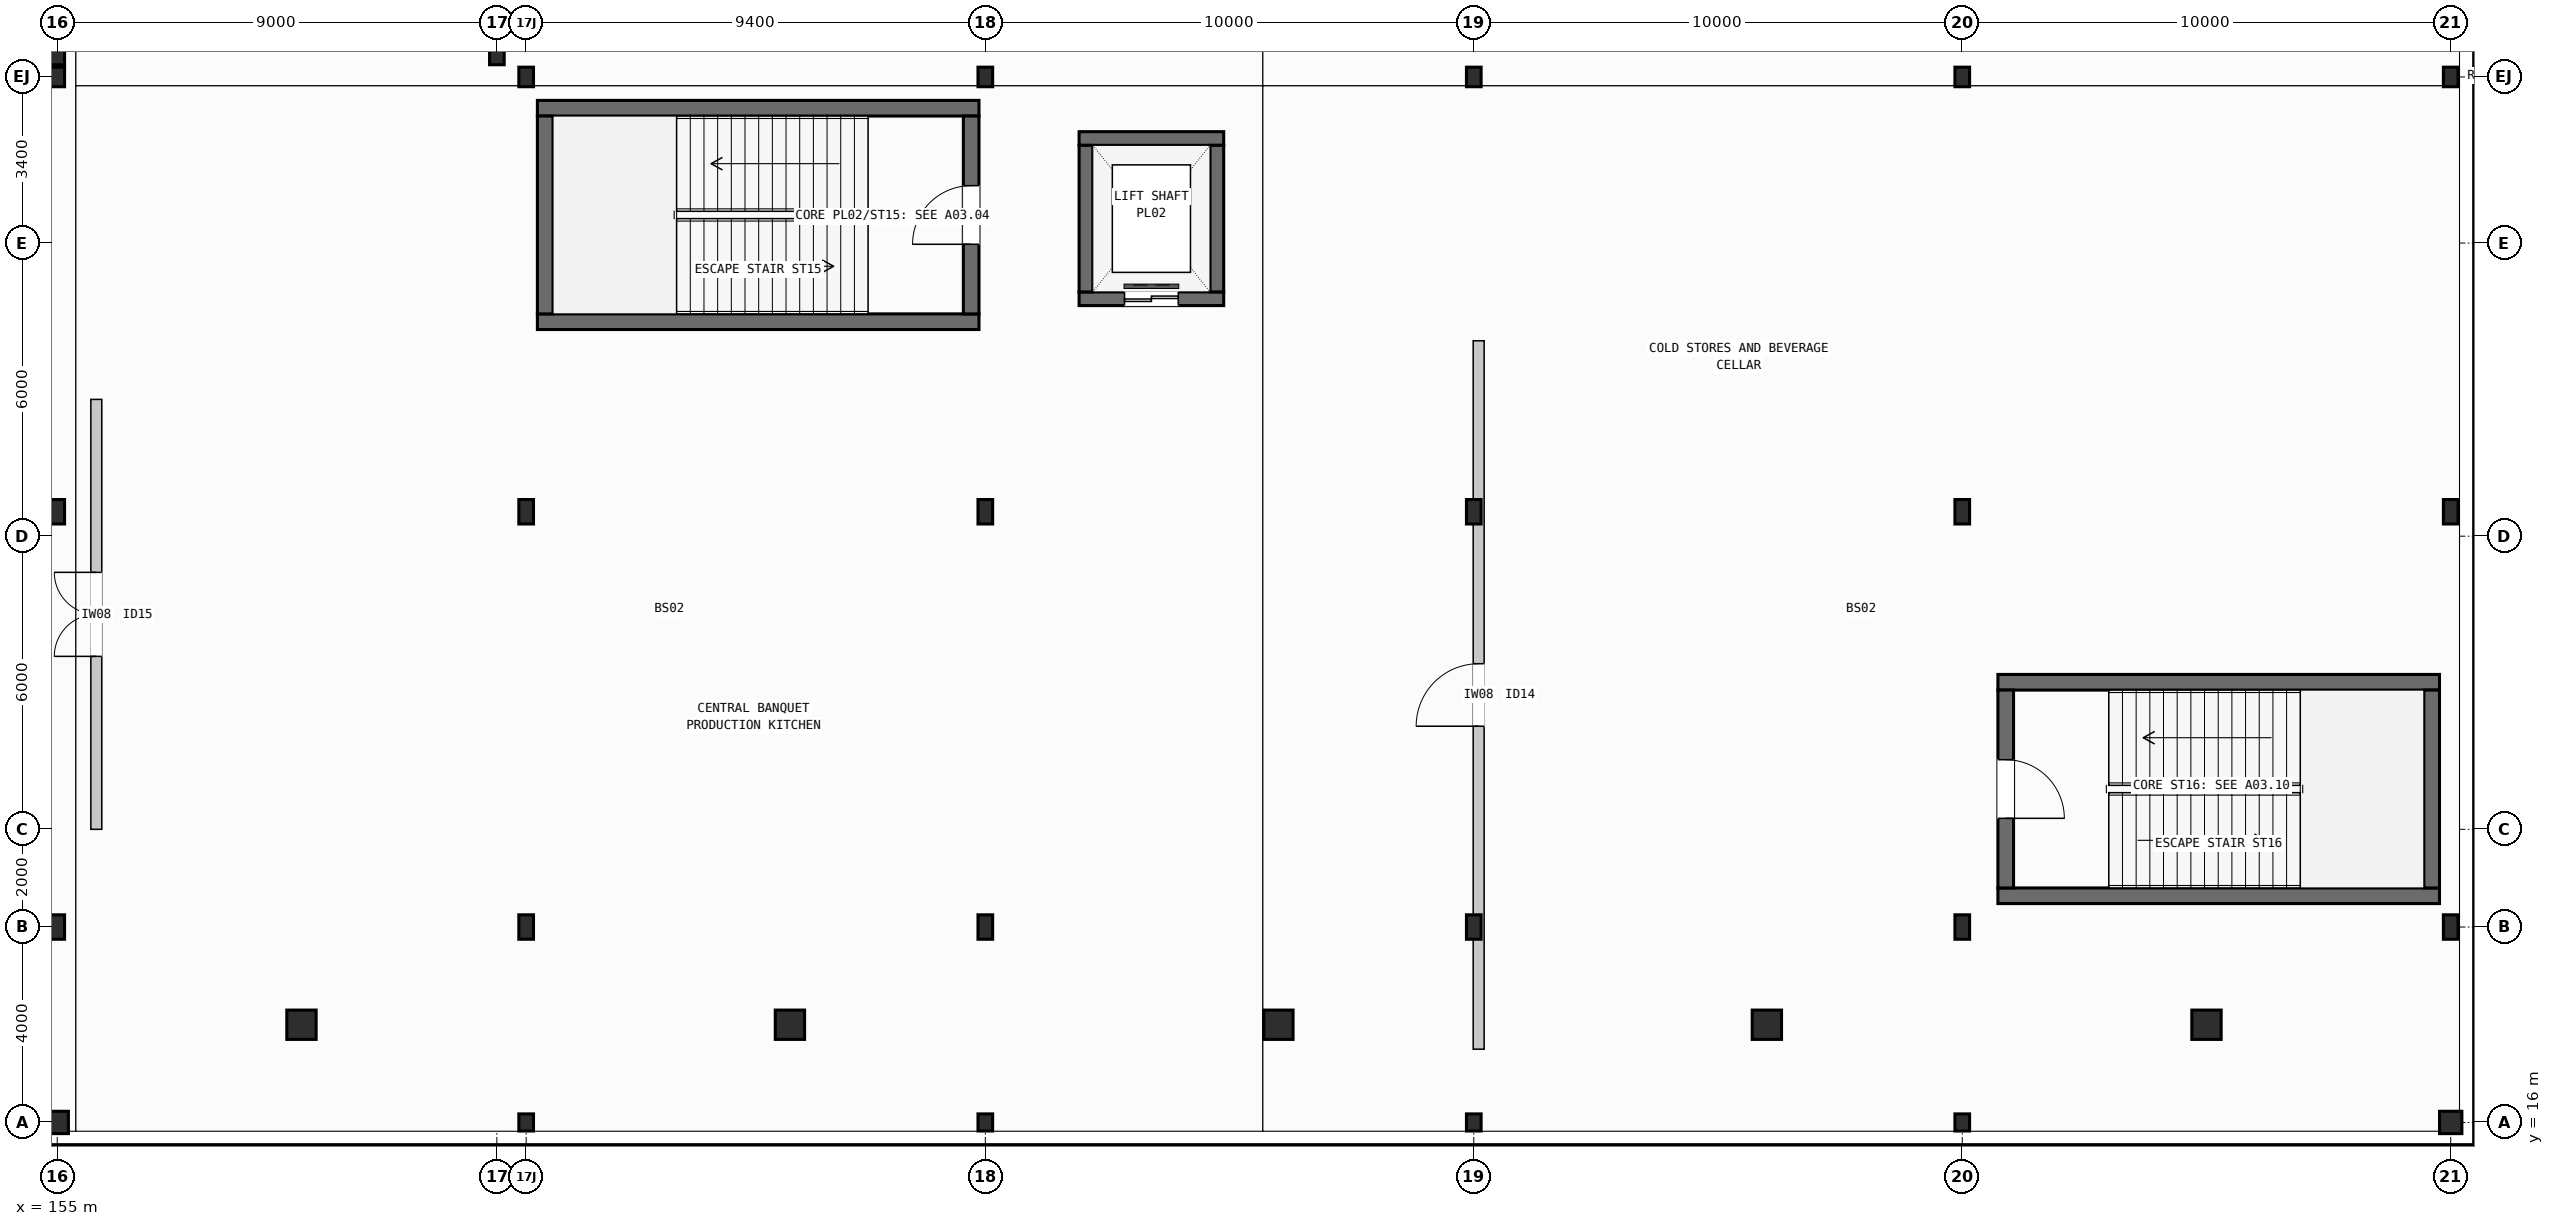
"""IFC4 building model, lengths in metres.
Left out: names, types, materials, properties, quantities, classifications, styles, units other than length and angle.
Written with IfcOpenShell. Run it as: python <this file> out.ifc"""

import sys

from ifc_helpers import new_model, si_unit, direction, frame, frame_2d, origin, origin_2d, place, context, subcontext, project, spatial, rectangle, hollow_circle, i_section, extrude, element, fill, save


model = new_model("IFC4")
c1 = context("Model", 3, precision=1e-05, world=origin(), true_north=direction((0.0, 1.0)))
c2 = subcontext(c1, "Body", "Model", "MODEL_VIEW")
j1 = project(units=[si_unit("LENGTHUNIT", "METRE"), si_unit("PLANEANGLEUNIT", "RADIAN")], contexts=[c1])
p1 = place(None, origin())
s1 = spatial("IfcSite", under=j1, at=p1, CompositionType="ELEMENT")
p2 = place(p1, origin())
s2 = spatial("IfcBuilding", under=s1, at=p2, CompositionType="ELEMENT")
p3 = place(p2, frame((0.0, 0.0, -5.4)))
s3 = spatial("IfcBuildingStorey", under=s2, at=p3, CompositionType="ELEMENT", Elevation=-5.4)
p4 = place(p3, frame((155.0, 16.0, 0.0), z_axis=(0.0, 0.0, 1.0), x_axis=(1.0, 0.0, 0.0)))
e1 = element("IfcColumn", 1, at=p4, inside=s3, PredefinedType="COLUMN", context=c2, shape_type="SweptSolid", body=[
    extrude(hollow_circle(Radius=0.229, WallThickness=0.016, at=origin_2d()), origin(), (0.0, 0.0, 1.0), 5.4),
])
for number, where, z_axis, x_axis in (
    (2, (155.0, 20.0, 0.0), (0.0, 0.0, 1.0), (1.0, 0.0, 0.0)),
    (3, (155.0, 28.5, 0.0), (0.0, 0.0, 1.0), (1.0, 0.0, 0.0)),
):
    element("IfcColumn", number, at=place(p3, frame(where, z_axis=z_axis, x_axis=x_axis)), inside=s3, PredefinedType="COLUMN", context=c2, shape_type="SweptSolid", body=[
        extrude(i_section(OverallWidth=0.3, OverallDepth=0.5, WebThickness=0.014, FlangeThickness=0.028, FilletRadius=0.027, at=origin_2d()), origin(), (0.0, 0.0, 1.0), 5.4),
    ])
p5 = place(p3, frame((155.0, 37.4, 0.0), z_axis=(0.0, 0.0, 1.0), x_axis=(1.0, 0.0, 0.0)))
e4 = element("IfcColumn", 4, at=p5, inside=s3, PredefinedType="COLUMN", context=c2, shape_type="SweptSolid", body=[
    extrude(i_section(OverallWidth=0.3, OverallDepth=0.4, WebThickness=0.013, FlangeThickness=0.024, FilletRadius=0.027, at=origin_2d()), origin(), (0.0, 0.0, 1.0), 5.4),
])
for number, where, z_axis, x_axis in (
    (5, (155.0, 38.0, 0.0), (0.0, 0.0, 1.0), (1.0, 0.0, 0.0)),
    (6, (164.0, 38.0, 0.0), (0.0, 0.0, 1.0), (1.0, 0.0, 0.0)),
):
    element("IfcColumn", number, at=place(p3, frame(where, z_axis=z_axis, x_axis=x_axis)), inside=s3, PredefinedType="COLUMN", context=c2, shape_type="SweptSolid", body=[
        extrude(i_section(OverallWidth=0.3, OverallDepth=0.7, WebThickness=0.017, FlangeThickness=0.032, FilletRadius=0.027, at=origin_2d()), origin(), (0.0, 0.0, 1.0), 5.4),
    ])
p6 = place(p3, frame((164.6, 16.0, 0.0), z_axis=(0.0, 0.0, 1.0), x_axis=(1.0, 0.0, 0.0)))
e7 = element("IfcColumn", 7, at=p6, inside=s3, PredefinedType="PILASTER", context=c2, shape_type="SweptSolid", body=[
    extrude(i_section(OverallWidth=0.3, OverallDepth=0.35, WebThickness=0.01, FlangeThickness=0.018, FilletRadius=0.027, at=origin_2d()), origin(), (0.0, 0.0, 1.0), 5.4),
])
for number, where, z_axis, x_axis in (
    (8, (164.6, 20.0, 0.0), (0.0, 0.0, 1.0), (1.0, 0.0, 0.0)),
    (9, (164.6, 28.5, 0.0), (0.0, 0.0, 1.0), (1.0, 0.0, 0.0)),
):
    element("IfcColumn", number, at=place(p3, frame(where, z_axis=z_axis, x_axis=x_axis)), inside=s3, PredefinedType="COLUMN", context=c2, shape_type="SweptSolid", body=[
        extrude(i_section(OverallWidth=0.3, OverallDepth=0.5, WebThickness=0.014, FlangeThickness=0.028, FilletRadius=0.027, at=origin_2d()), origin(), (0.0, 0.0, 1.0), 5.4),
    ])
p7 = place(p3, frame((164.6, 37.4, 0.0), z_axis=(0.0, 0.0, 1.0), x_axis=(1.0, 0.0, 0.0)))
e10 = element("IfcColumn", 10, at=p7, inside=s3, PredefinedType="COLUMN", context=c2, shape_type="SweptSolid", body=[
    extrude(i_section(OverallWidth=0.3, OverallDepth=0.4, WebThickness=0.013, FlangeThickness=0.024, FilletRadius=0.027, at=origin_2d()), origin(), (0.0, 0.0, 1.0), 5.4),
])
p8 = place(p3, frame((174.0, 16.0, 0.0), z_axis=(0.0, 0.0, 1.0), x_axis=(1.0, 0.0, 0.0)))
e11 = element("IfcColumn", 11, at=p8, inside=s3, PredefinedType="PILASTER", context=c2, shape_type="SweptSolid", body=[
    extrude(i_section(OverallWidth=0.3, OverallDepth=0.35, WebThickness=0.01, FlangeThickness=0.018, FilletRadius=0.027, at=origin_2d()), origin(), (0.0, 0.0, 1.0), 5.4),
])
for number, where, z_axis, x_axis in (
    (12, (174.0, 20.0, 0.0), (0.0, 0.0, 1.0), (1.0, 0.0, 0.0)),
    (13, (174.0, 28.5, 0.0), (0.0, 0.0, 1.0), (1.0, 0.0, 0.0)),
):
    element("IfcColumn", number, at=place(p3, frame(where, z_axis=z_axis, x_axis=x_axis)), inside=s3, PredefinedType="COLUMN", context=c2, shape_type="SweptSolid", body=[
        extrude(i_section(OverallWidth=0.3, OverallDepth=0.5, WebThickness=0.014, FlangeThickness=0.028, FilletRadius=0.027, at=origin_2d()), origin(), (0.0, 0.0, 1.0), 5.4),
    ])
p9 = place(p3, frame((174.0, 37.4, 0.0), z_axis=(0.0, 0.0, 1.0), x_axis=(1.0, 0.0, 0.0)))
e14 = element("IfcColumn", 14, at=p9, inside=s3, PredefinedType="COLUMN", context=c2, shape_type="SweptSolid", body=[
    extrude(i_section(OverallWidth=0.3, OverallDepth=0.4, WebThickness=0.013, FlangeThickness=0.024, FilletRadius=0.027, at=origin_2d()), origin(), (0.0, 0.0, 1.0), 5.4),
])
p10 = place(p3, frame((184.0, 16.0, 0.0), z_axis=(0.0, 0.0, 1.0), x_axis=(1.0, 0.0, 0.0)))
e15 = element("IfcColumn", 15, at=p10, inside=s3, PredefinedType="PILASTER", context=c2, shape_type="SweptSolid", body=[
    extrude(i_section(OverallWidth=0.3, OverallDepth=0.35, WebThickness=0.01, FlangeThickness=0.018, FilletRadius=0.027, at=origin_2d()), origin(), (0.0, 0.0, 1.0), 5.4),
])
for number, where, z_axis, x_axis in (
    (16, (184.0, 20.0, 0.0), (0.0, 0.0, 1.0), (1.0, 0.0, 0.0)),
    (17, (184.0, 28.5, 0.0), (0.0, 0.0, 1.0), (1.0, 0.0, 0.0)),
):
    element("IfcColumn", number, at=place(p3, frame(where, z_axis=z_axis, x_axis=x_axis)), inside=s3, PredefinedType="COLUMN", context=c2, shape_type="SweptSolid", body=[
        extrude(i_section(OverallWidth=0.3, OverallDepth=0.5, WebThickness=0.014, FlangeThickness=0.028, FilletRadius=0.027, at=origin_2d()), origin(), (0.0, 0.0, 1.0), 5.4),
    ])
p11 = place(p3, frame((184.0, 37.4, 0.0), z_axis=(0.0, 0.0, 1.0), x_axis=(1.0, 0.0, 0.0)))
e18 = element("IfcColumn", 18, at=p11, inside=s3, PredefinedType="COLUMN", context=c2, shape_type="SweptSolid", body=[
    extrude(i_section(OverallWidth=0.3, OverallDepth=0.4, WebThickness=0.013, FlangeThickness=0.024, FilletRadius=0.027, at=origin_2d()), origin(), (0.0, 0.0, 1.0), 5.4),
])
p12 = place(p3, frame((194.0, 16.0, 0.0), z_axis=(0.0, 0.0, 1.0), x_axis=(1.0, 0.0, 0.0)))
e19 = element("IfcColumn", 19, at=p12, inside=s3, PredefinedType="PILASTER", context=c2, shape_type="SweptSolid", body=[
    extrude(i_section(OverallWidth=0.3, OverallDepth=0.35, WebThickness=0.01, FlangeThickness=0.018, FilletRadius=0.027, at=origin_2d()), origin(), (0.0, 0.0, 1.0), 5.4),
])
for number, where, z_axis, x_axis in (
    (20, (194.0, 20.0, 0.0), (0.0, 0.0, 1.0), (1.0, 0.0, 0.0)),
    (21, (194.0, 28.5, 0.0), (0.0, 0.0, 1.0), (1.0, 0.0, 0.0)),
):
    element("IfcColumn", number, at=place(p3, frame(where, z_axis=z_axis, x_axis=x_axis)), inside=s3, PredefinedType="COLUMN", context=c2, shape_type="SweptSolid", body=[
        extrude(i_section(OverallWidth=0.3, OverallDepth=0.5, WebThickness=0.014, FlangeThickness=0.028, FilletRadius=0.027, at=origin_2d()), origin(), (0.0, 0.0, 1.0), 5.4),
    ])
p13 = place(p3, frame((194.0, 37.4, 0.0), z_axis=(0.0, 0.0, 1.0), x_axis=(1.0, 0.0, 0.0)))
e22 = element("IfcColumn", 22, at=p13, inside=s3, PredefinedType="COLUMN", context=c2, shape_type="SweptSolid", body=[
    extrude(i_section(OverallWidth=0.3, OverallDepth=0.4, WebThickness=0.013, FlangeThickness=0.024, FilletRadius=0.027, at=origin_2d()), origin(), (0.0, 0.0, 1.0), 5.4),
])
p14 = place(p3, frame((204.0, 16.0, 0.0), z_axis=(0.0, 0.0, 1.0), x_axis=(1.0, 0.0, 0.0)))
e23 = element("IfcColumn", 23, at=p14, inside=s3, PredefinedType="COLUMN", context=c2, shape_type="SweptSolid", body=[
    extrude(hollow_circle(Radius=0.229, WallThickness=0.016, at=origin_2d()), origin(), (0.0, 0.0, 1.0), 5.4),
])
for number, where, z_axis, x_axis in (
    (24, (204.0, 20.0, 0.0), (0.0, 0.0, 1.0), (1.0, 0.0, 0.0)),
    (25, (204.0, 28.5, 0.0), (0.0, 0.0, 1.0), (1.0, 0.0, 0.0)),
):
    element("IfcColumn", number, at=place(p3, frame(where, z_axis=z_axis, x_axis=x_axis)), inside=s3, PredefinedType="COLUMN", context=c2, shape_type="SweptSolid", body=[
        extrude(i_section(OverallWidth=0.3, OverallDepth=0.5, WebThickness=0.014, FlangeThickness=0.028, FilletRadius=0.027, at=origin_2d()), origin(), (0.0, 0.0, 1.0), 5.4),
    ])
p15 = place(p3, frame((204.0, 37.4, 0.0), z_axis=(0.0, 0.0, 1.0), x_axis=(1.0, 0.0, 0.0)))
e26 = element("IfcColumn", 26, at=p15, inside=s3, PredefinedType="COLUMN", context=c2, shape_type="SweptSolid", body=[
    extrude(i_section(OverallWidth=0.3, OverallDepth=0.4, WebThickness=0.013, FlangeThickness=0.024, FilletRadius=0.027, at=origin_2d()), origin(), (0.0, 0.0, 1.0), 5.4),
])
for number, where, z_axis, x_axis in (
    (27, (164.83, 32.39, 0.0), (0.0, 0.0, 1.0), (1.0, 0.0, 0.0)),
    (28, (164.83, 36.76, 0.0), (0.0, 0.0, 1.0), (1.0, 0.0, 0.0)),
):
    element("IfcWall", number, at=place(p3, frame(where, z_axis=z_axis, x_axis=x_axis)), inside=s3, PredefinedType="SHEAR", context=c2, shape_type="SweptSolid", body=[
        extrude(rectangle(XDim=9.04, YDim=0.32, at=frame_2d((4.52, 0.0))), origin(), (0.0, 0.0, 1.0), 5.4),
    ])
p16 = place(p3, frame((164.99, 32.55, 0.0), z_axis=(0.0, 0.0, 1.0), x_axis=(0.0, 1.0, 0.0)))
e29 = element("IfcWall", 29, at=p16, inside=s3, PredefinedType="SHEAR", context=c2, shape_type="SweptSolid", body=[
    extrude(rectangle(XDim=4.05, YDim=0.32, at=frame_2d((2.025, 0.0))), origin(), (0.0, 0.0, 1.0), 5.4),
])
p17 = place(p3, frame((173.71, 32.55, 0.0), z_axis=(0.0, 0.0, 1.0), x_axis=(0.0, 1.0, 0.0)))
e30 = element("IfcWall", 30, at=p17, inside=s3, PredefinedType="SHEAR", context=c2, shape_type="SweptSolid", body=[
    extrude(rectangle(XDim=4.05, YDim=0.32, at=frame_2d((2.025, 0.0))), origin(), (0.0, 0.0, 1.0), 5.4),
])
p18 = place(p17, frame((1.425, 0.0, 0.0)))
e31 = element("IfcOpeningElement", 31, at=p18, cuts=e30, PredefinedType="OPENING", context=c2, shape_type="SweptSolid", body=[
    extrude(rectangle(XDim=1.2, YDim=2.2, at=frame_2d((0.6, 1.1))), frame((0.0, 0.17, 0.0), z_axis=(0.0, -1.0, 0.0), x_axis=(1.0, 0.0, 0.0)), (0.0, 0.0, 1.0), 0.34),
])
for number, where, z_axis, x_axis in (
    (32, (194.73, 20.64, 0.0), (0.0, 0.0, 1.0), (1.0, 0.0, 0.0)),
    (33, (194.73, 25.01, 0.0), (0.0, 0.0, 1.0), (1.0, 0.0, 0.0)),
):
    element("IfcWall", number, at=place(p3, frame(where, z_axis=z_axis, x_axis=x_axis)), inside=s3, PredefinedType="SHEAR", context=c2, shape_type="SweptSolid", body=[
        extrude(rectangle(XDim=9.04, YDim=0.32, at=frame_2d((4.52, 0.0))), origin(), (0.0, 0.0, 1.0), 5.4),
    ])
p19 = place(p3, frame((194.89, 20.8, 0.0), z_axis=(0.0, 0.0, 1.0), x_axis=(0.0, 1.0, 0.0)))
e34 = element("IfcWall", 34, at=p19, inside=s3, PredefinedType="SHEAR", context=c2, shape_type="SweptSolid", body=[
    extrude(rectangle(XDim=4.05, YDim=0.32, at=frame_2d((2.025, 0.0))), origin(), (0.0, 0.0, 1.0), 5.4),
])
p20 = place(p19, frame((1.425, 0.0, 0.0)))
e35 = element("IfcOpeningElement", 35, at=p20, cuts=e34, PredefinedType="OPENING", context=c2, shape_type="SweptSolid", body=[
    extrude(rectangle(XDim=1.2, YDim=2.2, at=frame_2d((0.6, 1.1))), frame((0.0, 0.17, 0.0), z_axis=(0.0, -1.0, 0.0), x_axis=(1.0, 0.0, 0.0)), (0.0, 0.0, 1.0), 0.34),
])
p21 = place(p3, frame((203.61, 20.8, 0.0), z_axis=(0.0, 0.0, 1.0), x_axis=(0.0, 1.0, 0.0)))
e36 = element("IfcWall", 36, at=p21, inside=s3, PredefinedType="SHEAR", context=c2, shape_type="SweptSolid", body=[
    extrude(rectangle(XDim=4.05, YDim=0.32, at=frame_2d((2.025, 0.0))), origin(), (0.0, 0.0, 1.0), 5.4),
])
p22 = place(p3, frame((175.92, 32.86, 0.0), z_axis=(0.0, 0.0, 1.0), x_axis=(1.0, 0.0, 0.0)))
e37 = element("IfcWall", 37, at=p22, inside=s3, PredefinedType="SHEAR", context=c2, shape_type="SweptSolid", body=[
    extrude(rectangle(XDim=2.96, YDim=0.28, at=frame_2d((1.48, 0.0))), origin(), (0.0, 0.0, 1.0), 5.4),
])
p23 = place(p22, frame((0.93, 0.0, 0.0)))
e38 = element("IfcOpeningElement", 38, at=p23, cuts=e37, PredefinedType="OPENING", context=c2, shape_type="SweptSolid", body=[
    extrude(rectangle(XDim=1.1, YDim=2.15, at=frame_2d((0.55, 1.075))), frame((0.0, 0.15, 0.0), z_axis=(0.0, -1.0, 0.0), x_axis=(1.0, 0.0, 0.0)), (0.0, 0.0, 1.0), 0.3),
])
p24 = place(p3, frame((175.92, 36.14, 0.0), z_axis=(0.0, 0.0, 1.0), x_axis=(1.0, 0.0, 0.0)))
e39 = element("IfcWall", 39, at=p24, inside=s3, PredefinedType="SHEAR", context=c2, shape_type="SweptSolid", body=[
    extrude(rectangle(XDim=2.96, YDim=0.28, at=frame_2d((1.48, 0.0))), origin(), (0.0, 0.0, 1.0), 5.4),
])
for number, where, z_axis, x_axis in (
    (40, (176.06, 33.0, 0.0), (0.0, 0.0, 1.0), (0.0, 1.0, 0.0)),
    (41, (178.74, 33.0, 0.0), (0.0, 0.0, 1.0), (0.0, 1.0, 0.0)),
):
    element("IfcWall", number, at=place(p3, frame(where, z_axis=z_axis, x_axis=x_axis)), inside=s3, PredefinedType="SHEAR", context=c2, shape_type="SweptSolid", body=[
        extrude(rectangle(XDim=3.0, YDim=0.28, at=frame_2d((1.5, 0.0))), origin(), (0.0, 0.0, 1.0), 5.4),
    ])
p25 = place(p3, frame((204.65, 134.478, 0.0), z_axis=(0.0, 0.0, 1.0), x_axis=(0.0, -1.0, 0.0)))
e42 = element("IfcWall", 42, at=p25, inside=s3, PredefinedType="SOLIDWALL", context=c2, shape_type="SweptSolid", body=[
    extrude(rectangle(XDim=118.956, YDim=0.36, at=frame_2d((59.478, 0.0))), origin(), (0.0, 0.0, 1.0), 5.048),
])
p26 = place(p3, frame((204.845, 15.35, 0.0), z_axis=(0.0, 0.0, 1.0), x_axis=(-1.0, 0.0, 0.0)))
e43 = element("IfcWall", 43, at=p26, inside=s3, PredefinedType="SOLIDWALL", context=c2, shape_type="SweptSolid", body=[
    extrude(rectangle(XDim=185.69, YDim=0.39, at=frame_2d((92.845, 0.0))), origin(), (0.0, 0.0, 1.0), 5.048),
])
for number, where, z_axis, x_axis in (
    (44, (160.0, 18.0, 0.0), (0.0, 0.0, 1.0), (1.0, 0.0, 0.0)),
    (45, (170.0, 18.0, 0.0), (0.0, 0.0, 1.0), (1.0, 0.0, 0.0)),
    (46, (180.0, 18.0, 0.0), (0.0, 0.0, 1.0), (1.0, 0.0, 0.0)),
    (47, (190.0, 18.0, 0.0), (0.0, 0.0, 1.0), (1.0, 0.0, 0.0)),
    (48, (199.0, 18.0, 0.0), (0.0, 0.0, 1.0), (1.0, 0.0, 0.0)),
):
    element("IfcColumn", number, at=place(p3, frame(where, z_axis=z_axis, x_axis=x_axis)), inside=s3, PredefinedType="COLUMN", context=c2, shape_type="SweptSolid", body=[
        extrude(rectangle(XDim=0.6, YDim=0.6, at=origin_2d()), origin(), (0.0, 0.0, 1.0), 5.05),
    ])
p27 = place(p3, frame((155.8, 22.0, 0.0), z_axis=(0.0, 0.0, 1.0), x_axis=(0.0, 1.0, 0.0)))
e49 = element("IfcWall", 49, at=p27, inside=s3, PredefinedType="PARTITIONING", context=c2, shape_type="SweptSolid", body=[
    extrude(rectangle(XDim=8.8, YDim=0.224, at=frame_2d((4.4, 0.0))), origin(), (0.0, 0.0, 1.0), 4.4),
])
p28 = place(p27, frame((3.54, 0.0, 0.0)))
e50 = element("IfcOpeningElement", 50, at=p28, cuts=e49, PredefinedType="OPENING", context=c2, shape_type="SweptSolid", body=[
    extrude(rectangle(XDim=1.72, YDim=2.28, at=frame_2d((0.86, 1.14))), frame((0.0, 0.122, 0.0), z_axis=(0.0, -1.0, 0.0), x_axis=(1.0, 0.0, 0.0)), (0.0, 0.0, 1.0), 0.244),
])
p29 = place(p3, frame((184.1, 17.5, 0.0), z_axis=(0.0, 0.0, 1.0), x_axis=(0.0, 1.0, 0.0)))
e51 = element("IfcWall", 51, at=p29, inside=s3, PredefinedType="PARTITIONING", context=c2, shape_type="SweptSolid", body=[
    extrude(rectangle(XDim=14.5, YDim=0.224, at=frame_2d((7.25, 0.0))), origin(), (0.0, 0.0, 1.0), 4.4),
])
p30 = place(p29, frame((6.61, 0.0, 0.0)))
e52 = element("IfcOpeningElement", 52, at=p30, cuts=e51, PredefinedType="OPENING", context=c2, shape_type="SweptSolid", body=[
    extrude(rectangle(XDim=1.28, YDim=2.24, at=frame_2d((0.64, 1.12))), frame((0.0, 0.122, 0.0), z_axis=(0.0, -1.0, 0.0), x_axis=(1.0, 0.0, 0.0)), (0.0, 0.0, 1.0), 0.244),
])
p31 = place(p18, origin())
e53 = element("IfcDoor", 53, at=p31, inside=s3, OperationType="SINGLE_SWING_LEFT", PredefinedType="DOOR", context=c2, shape_type="SweptSolid", body=[
    extrude(rectangle(XDim=1.2, YDim=2.2, at=frame_2d((0.6, 1.1))), frame((0.0, 0.025, 0.0), z_axis=(0.0, -1.0, 0.0), x_axis=(1.0, 0.0, 0.0)), (0.0, 0.0, 1.0), 0.05),
])
fill(e31, e53)
p32 = place(p20, frame((1.2, 0.0, 0.0), z_axis=(0.0, 0.0, 1.0), x_axis=(-1.0, 0.0, 0.0)))
e54 = element("IfcDoor", 54, at=p32, inside=s3, OperationType="SINGLE_SWING_RIGHT", PredefinedType="DOOR", context=c2, shape_type="SweptSolid", body=[
    extrude(rectangle(XDim=1.2, YDim=2.2, at=frame_2d((0.6, 1.1))), frame((0.0, 0.025, 0.0), z_axis=(0.0, -1.0, 0.0), x_axis=(1.0, 0.0, 0.0)), (0.0, 0.0, 1.0), 0.05),
])
fill(e35, e54)
p33 = place(p23, origin())
e55 = element("IfcDoor", 55, at=p33, inside=s3, OperationType="DOUBLE_DOOR_SLIDING", PredefinedType="DOOR", context=c2, shape_type="SweptSolid", body=[
    extrude(rectangle(XDim=1.1, YDim=2.15, at=frame_2d((0.55, 1.075))), frame((0.0, 0.025, 0.0), z_axis=(0.0, -1.0, 0.0), x_axis=(1.0, 0.0, 0.0)), (0.0, 0.0, 1.0), 0.05),
])
fill(e38, e55)
p34 = place(p28, origin())
e56 = element("IfcDoor", 56, at=p34, inside=s3, OperationType="DOUBLE_DOOR_SINGLE_SWING", PredefinedType="DOOR", context=c2, shape_type="SweptSolid", body=[
    extrude(rectangle(XDim=1.72, YDim=2.28, at=frame_2d((0.86, 1.14))), frame((0.0, 0.025, 0.0), z_axis=(0.0, -1.0, 0.0), x_axis=(1.0, 0.0, 0.0)), (0.0, 0.0, 1.0), 0.05),
])
fill(e50, e56)
p35 = place(p30, origin())
e57 = element("IfcDoor", 57, at=p35, inside=s3, OperationType="SINGLE_SWING_LEFT", PredefinedType="DOOR", context=c2, shape_type="SweptSolid", body=[
    extrude(rectangle(XDim=1.28, YDim=2.24, at=frame_2d((0.64, 1.12))), frame((0.0, 0.025, 0.0), z_axis=(0.0, -1.0, 0.0), x_axis=(1.0, 0.0, 0.0)), (0.0, 0.0, 1.0), 0.05),
])
fill(e52, e57)
save(model, sys.argv[1])
